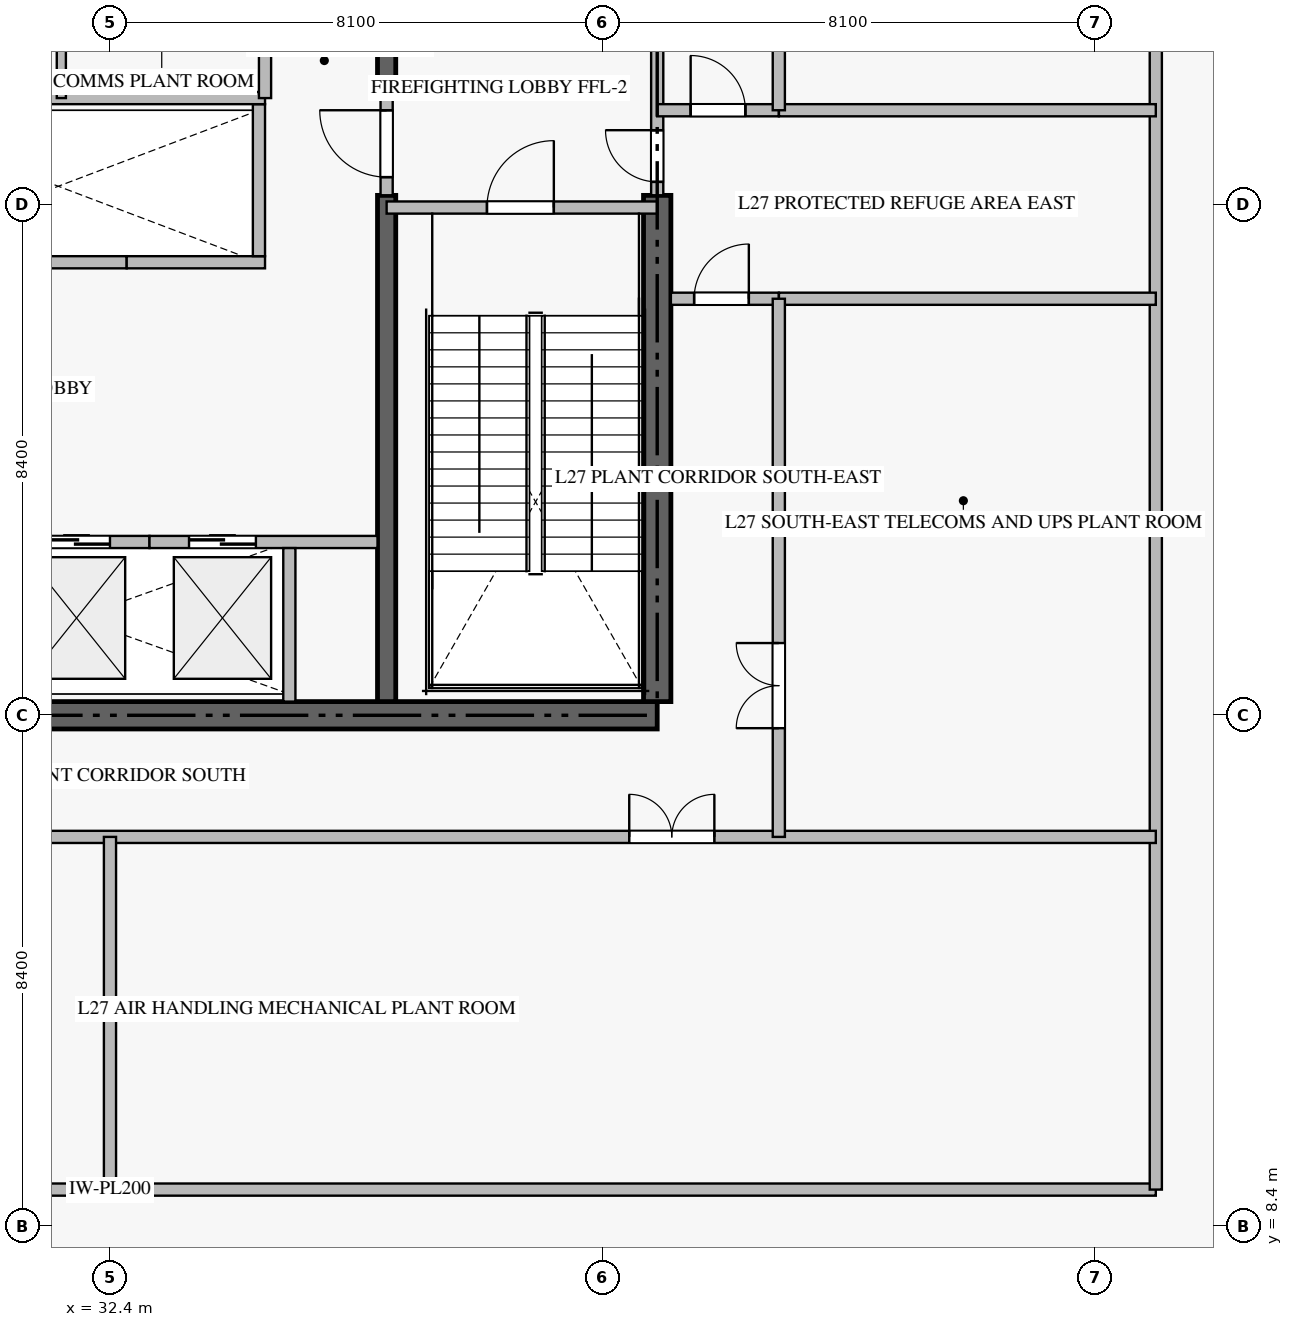
"""IFC4 building model, lengths in metres.
Left out: names, types, materials, properties, quantities, classifications, styles, units other than length and angle.
Written with IfcOpenShell. Run it as: python <this file> out.ifc"""

import sys

from ifc_helpers import new_model, si_unit, direction, frame, frame_2d, origin, place, context, subcontext, project, spatial, rectangle, extrude, source, transform, mapped, element, fill, save


model = new_model("IFC4")
c1 = context("Model", 3, precision=1e-05, world=origin(), true_north=direction((0.0, 1.0)))
c2 = subcontext(c1, "Body", "Model", "MODEL_VIEW")
j1 = project(units=[si_unit("LENGTHUNIT", "METRE"), si_unit("PLANEANGLEUNIT", "RADIAN")], contexts=[c1])
p1 = place(None, origin())
s1 = spatial("IfcSite", under=j1, at=p1, CompositionType="ELEMENT")
p2 = place(p1, origin())
s2 = spatial("IfcBuilding", under=s1, at=p2, CompositionType="ELEMENT")
p3 = place(p2, frame((0.0, 0.0, 109.2)))
s3 = spatial("IfcBuildingStorey", under=s2, at=p3, CompositionType="ELEMENT", Elevation=109.2)
p4 = place(p3, frame((23.4, 16.8, -0.36), z_axis=(0.0, 0.0, 1.0), x_axis=(1.0, 0.0, 0.0)))
e1 = element("IfcWall", 1, at=p4, inside=s3, PredefinedType="SHEAR", context=c2, shape_type="SweptSolid", body=[
    extrude(rectangle(XDim=18.0, YDim=0.45, at=frame_2d((9.0, 0.0))), origin(), (0.0, 0.0, 1.0), 5.998),
])
p5 = place(p3, frame((41.4, 17.025, -0.36), z_axis=(0.0, 0.0, 1.0), x_axis=(0.0, 1.0, 0.0)))
e2 = element("IfcWall", 2, at=p5, inside=s3, PredefinedType="SHEAR", context=c2, shape_type="SweptSolid", body=[
    extrude(rectangle(XDim=8.325, YDim=0.45, at=frame_2d((4.163, 0.0))), origin(), (0.0, 0.0, 1.0), 5.998),
])
p6 = place(p3, frame((36.95, 17.025, -0.36), z_axis=(0.0, 0.0, 1.0), x_axis=(0.0, 1.0, 0.0)))
e3 = element("IfcWall", 3, at=p6, inside=s3, PredefinedType="SHEAR", context=c2, shape_type="SweptSolid", body=[
    extrude(rectangle(XDim=8.325, YDim=0.3, at=frame_2d((4.163, 0.0))), origin(), (0.0, 0.0, 1.0), 5.998),
])
p7 = place(p3, frame((36.95, 27.05, -0.36), z_axis=(0.0, 0.0, 1.0), x_axis=(0.0, 1.0, 0.0)))
e4 = element("IfcWall", 4, at=p7, inside=s3, PredefinedType="SHEAR", context=c2, shape_type="SweptSolid", body=[
    extrude(rectangle(XDim=6.325, YDim=0.3, at=frame_2d((3.163, 0.0))), origin(), (0.0, 0.0, 1.0), 5.998),
])
p8 = place(p3, frame((36.95, 25.15, 0.0), z_axis=(0.0, 0.0, 1.0), x_axis=(1.0, 0.0, 0.0)))
e5 = element("IfcWall", 5, at=p8, inside=s3, PredefinedType="STANDARD", context=c2, shape_type="SweptSolid", body=[
    extrude(rectangle(XDim=4.45, YDim=0.2, at=frame_2d((2.225, 0.0))), origin(), (0.0, 0.0, 1.0), 5.64),
])
p9 = place(p8, frame((1.65, 0.0, 0.0)))
e6 = element("IfcOpeningElement", 6, at=p9, cuts=e5, PredefinedType="OPENING", context=c2, shape_type="SweptSolid", body=[
    extrude(rectangle(XDim=1.1, YDim=2.15, at=frame_2d((0.55, 1.075))), frame((0.0, 0.11, 0.0), z_axis=(0.0, -1.0, 0.0), x_axis=(1.0, 0.0, 0.0)), (0.0, 0.0, 1.0), 0.22),
])
p10 = place(p3, frame((30.65, 19.65, 0.0), z_axis=(0.0, 0.0, 1.0), x_axis=(1.0, 0.0, 0.0)))
e7 = element("IfcWall", 7, at=p10, inside=s3, PredefinedType="STANDARD", context=c2, shape_type="SweptSolid", body=[
    extrude(rectangle(XDim=2.4, YDim=0.2, at=frame_2d((1.2, 0.0))), origin(), (0.0, 0.0, 1.0), 5.64),
])
p11 = place(p10, frame((0.65, 0.0, 0.0)))
e8 = element("IfcOpeningElement", 8, at=p11, cuts=e7, PredefinedType="OPENING", context=c2, shape_type="SweptSolid", body=[
    extrude(rectangle(XDim=1.1, YDim=2.2, at=frame_2d((0.55, 1.1))), frame((0.0, 0.11, 0.0), z_axis=(0.0, -1.0, 0.0), x_axis=(1.0, 0.0, 0.0)), (0.0, 0.0, 1.0), 0.22),
])
p12 = place(p3, frame((33.05, 19.65, 0.0), z_axis=(0.0, 0.0, 1.0), x_axis=(1.0, 0.0, 0.0)))
e9 = element("IfcWall", 9, at=p12, inside=s3, PredefinedType="STANDARD", context=c2, shape_type="SweptSolid", body=[
    extrude(rectangle(XDim=3.75, YDim=0.2, at=frame_2d((1.875, 0.0))), origin(), (0.0, 0.0, 1.0), 5.64),
])
p13 = place(p12, frame((0.65, 0.0, 0.0)))
e10 = element("IfcOpeningElement", 10, at=p13, cuts=e9, PredefinedType="OPENING", context=c2, shape_type="SweptSolid", body=[
    extrude(rectangle(XDim=1.1, YDim=2.2, at=frame_2d((0.55, 1.1))), frame((0.0, 0.11, 0.0), z_axis=(0.0, -1.0, 0.0), x_axis=(1.0, 0.0, 0.0)), (0.0, 0.0, 1.0), 0.22),
])
p14 = place(p3, frame((35.35, 17.025, 0.0), z_axis=(0.0, 0.0, 1.0), x_axis=(0.0, 1.0, 0.0)))
e11 = element("IfcWall", 11, at=p14, inside=s3, PredefinedType="STANDARD", context=c2, shape_type="SweptSolid", body=[
    extrude(rectangle(XDim=2.525, YDim=0.2, at=frame_2d((1.263, 0.0))), origin(), (0.0, 0.0, 1.0), 5.64),
])
p15 = place(p3, frame((30.425, 24.25, 0.0), z_axis=(0.0, 0.0, 1.0), x_axis=(1.0, 0.0, 0.0)))
e12 = element("IfcWall", 12, at=p15, inside=s3, PredefinedType="STANDARD", context=c2, shape_type="SweptSolid", body=[
    extrude(rectangle(XDim=2.25, YDim=0.2, at=frame_2d((1.125, 0.0))), origin(), (0.0, 0.0, 1.0), 5.64),
])
p16 = place(p3, frame((32.675, 24.25, 0.0), z_axis=(0.0, 0.0, 1.0), x_axis=(1.0, 0.0, 0.0)))
e13 = element("IfcWall", 13, at=p16, inside=s3, PredefinedType="STANDARD", context=c2, shape_type="SweptSolid", body=[
    extrude(rectangle(XDim=2.275, YDim=0.2, at=frame_2d((1.137, 0.0))), origin(), (0.0, 0.0, 1.0), 5.64),
])
p17 = place(p3, frame((34.85, 24.35, 0.0), z_axis=(0.0, 0.0, 1.0), x_axis=(0.0, 1.0, 0.0)))
e14 = element("IfcWall", 14, at=p17, inside=s3, PredefinedType="STANDARD", context=c2, shape_type="SweptSolid", body=[
    extrude(rectangle(XDim=2.5, YDim=0.2, at=frame_2d((1.25, 0.0))), origin(), (0.0, 0.0, 1.0), 5.64),
])
p18 = place(p3, frame((41.4, 25.352, 0.0), z_axis=(0.0, 0.0, 1.0), x_axis=(0.0, 1.0, 0.0)))
e15 = element("IfcWall", 15, at=p18, inside=s3, PredefinedType="STANDARD", context=c2, shape_type="SweptSolid", body=[
    extrude(rectangle(XDim=2.396, YDim=0.2, at=frame_2d((1.198, 0.0))), origin(), (0.0, 0.0, 1.0), 5.64),
])
p19 = place(p18, frame((0.22, 0.0, 0.0)))
e16 = element("IfcOpeningElement", 16, at=p19, cuts=e15, PredefinedType="OPENING", context=c2, shape_type="SweptSolid", body=[
    extrude(rectangle(XDim=0.85, YDim=2.1, at=frame_2d((0.425, 1.05))), frame((0.0, 0.11, 0.0), z_axis=(0.0, -1.0, 0.0), x_axis=(1.0, 0.0, 0.0)), (0.0, 0.0, 1.0), 0.22),
])
p20 = place(p3, frame((36.95, 25.352, 0.0), z_axis=(0.0, 0.0, 1.0), x_axis=(0.0, 1.0, 0.0)))
e17 = element("IfcWall", 17, at=p20, inside=s3, PredefinedType="STANDARD", context=c2, shape_type="SweptSolid", body=[
    extrude(rectangle(XDim=1.696, YDim=0.2, at=frame_2d((0.848, 0.0))), origin(), (0.0, 0.0, 1.0), 5.64),
])
p21 = place(p20, frame((0.298, 0.0, 0.0)))
e18 = element("IfcOpeningElement", 18, at=p21, cuts=e17, PredefinedType="OPENING", context=c2, shape_type="SweptSolid", body=[
    extrude(rectangle(XDim=1.1, YDim=2.15, at=frame_2d((0.55, 1.075))), frame((0.0, 0.11, 0.0), z_axis=(0.0, -1.0, 0.0), x_axis=(1.0, 0.0, 0.0)), (0.0, 0.0, 1.0), 0.22),
])
p22 = place(p3, frame((28.0, 26.95, 0.0), z_axis=(0.0, 0.0, 1.0), x_axis=(1.0, 0.0, 0.0)))
e19 = element("IfcWall", 19, at=p22, inside=s3, PredefinedType="STANDARD", context=c2, shape_type="SweptSolid", body=[
    extrude(rectangle(XDim=6.95, YDim=0.2, at=frame_2d((3.475, 0.0))), origin(), (0.0, 0.0, 1.0), 5.64),
])
p23 = place(p3, frame((34.95, 26.95, 0.0), z_axis=(0.0, 0.0, 1.0), x_axis=(0.0, 1.0, 0.0)))
e20 = element("IfcWall", 20, at=p23, inside=s3, PredefinedType="STANDARD", context=c2, shape_type="SweptSolid", body=[
    extrude(rectangle(XDim=3.6, YDim=0.2, at=frame_2d((1.8, 0.0))), origin(), (0.0, 0.0, 1.0), 5.64),
])
p24 = place(p23, frame((1.35, 0.0, 0.0)))
e21 = element("IfcOpeningElement", 21, at=p24, cuts=e20, PredefinedType="OPENING", context=c2, shape_type="SweptSolid", body=[
    extrude(rectangle(XDim=0.9, YDim=2.1, at=frame_2d((0.45, 1.05))), frame((0.0, 0.11, 0.0), z_axis=(0.0, -1.0, 0.0), x_axis=(1.0, 0.0, 0.0)), (0.0, 0.0, 1.0), 0.22),
])
p25 = place(p3, frame((31.6, 26.95, 0.0), z_axis=(0.0, 0.0, 1.0), x_axis=(0.0, 1.0, 0.0)))
e22 = element("IfcWall", 22, at=p25, inside=s3, PredefinedType="PARTITIONING", context=c2, shape_type="SweptSolid", body=[
    extrude(rectangle(XDim=3.6, YDim=0.15, at=frame_2d((1.8, 0.0))), origin(), (0.0, 0.0, 1.0), 5.64),
])
p26 = place(p25, frame((1.375, 0.0, 0.0)))
e23 = element("IfcOpeningElement", 23, at=p26, cuts=e22, PredefinedType="OPENING", context=c2, shape_type="SweptSolid", body=[
    extrude(rectangle(XDim=0.85, YDim=2.1, at=frame_2d((0.425, 1.05))), frame((0.0, 0.085, 0.0), z_axis=(0.0, -1.0, 0.0), x_axis=(1.0, 0.0, 0.0)), (0.0, 0.0, 1.0), 0.17),
])
p27 = place(p3, frame((15.2, 9.0, 0.0), z_axis=(0.0, 0.0, 1.0), x_axis=(1.0, 0.0, 0.0)))
e24 = element("IfcWall", 24, at=p27, inside=s3, PredefinedType="STANDARD", context=c2, shape_type="SweptSolid", body=[
    extrude(rectangle(XDim=34.4, YDim=0.2, at=frame_2d((17.2, 0.0))), origin(), (0.0, 0.0, 1.0), 5.64),
])
p28 = place(p3, frame((49.6, 9.0, 0.0), z_axis=(0.0, 0.0, 1.0), x_axis=(0.0, 1.0, 0.0)))
e25 = element("IfcWall", 25, at=p28, inside=s3, PredefinedType="STANDARD", context=c2, shape_type="SweptSolid", body=[
    extrude(rectangle(XDim=32.4, YDim=0.2, at=frame_2d((16.2, 0.0))), origin(), (0.0, 0.0, 1.0), 5.072),
])
p29 = place(p3, frame((41.625, 23.65, 0.0), z_axis=(0.0, 0.0, 1.0), x_axis=(1.0, 0.0, 0.0)))
e26 = element("IfcWall", 26, at=p29, inside=s3, PredefinedType="STANDARD", context=c2, shape_type="SweptSolid", body=[
    extrude(rectangle(XDim=1.775, YDim=0.2, at=frame_2d((0.887, 0.0))), origin(), (0.0, 0.0, 1.0), 5.64),
])
p30 = place(p29, frame((0.382, 0.0, 0.0)))
e27 = element("IfcOpeningElement", 27, at=p30, cuts=e26, PredefinedType="OPENING", context=c2, shape_type="SweptSolid", body=[
    extrude(rectangle(XDim=0.9, YDim=2.1, at=frame_2d((0.45, 1.05))), frame((0.0, 0.11, 0.0), z_axis=(0.0, -1.0, 0.0), x_axis=(1.0, 0.0, 0.0)), (0.0, 0.0, 1.0), 0.22),
])
p31 = place(p3, frame((43.402, 23.65, 0.0), z_axis=(0.0, 0.0, 1.0), x_axis=(1.0, 0.0, 0.0)))
e28 = element("IfcWall", 28, at=p31, inside=s3, PredefinedType="STANDARD", context=c2, shape_type="SweptSolid", body=[
    extrude(rectangle(XDim=6.198, YDim=0.2, at=frame_2d((3.099, 0.0))), origin(), (0.0, 0.0, 1.0), 5.64),
])
p32 = place(p3, frame((41.4, 26.75, 0.0), z_axis=(0.0, 0.0, 1.0), x_axis=(1.0, 0.0, 0.0)))
e29 = element("IfcWall", 29, at=p32, inside=s3, PredefinedType="STANDARD", context=c2, shape_type="SweptSolid", body=[
    extrude(rectangle(XDim=2.0, YDim=0.2, at=frame_2d((1.0, 0.0))), origin(), (0.0, 0.0, 1.0), 5.64),
])
p33 = place(p32, frame((0.55, 0.0, 0.0)))
e30 = element("IfcOpeningElement", 30, at=p33, cuts=e29, PredefinedType="OPENING", context=c2, shape_type="SweptSolid", body=[
    extrude(rectangle(XDim=0.9, YDim=2.1, at=frame_2d((0.45, 1.05))), frame((0.0, 0.11, 0.0), z_axis=(0.0, -1.0, 0.0), x_axis=(1.0, 0.0, 0.0)), (0.0, 0.0, 1.0), 0.22),
])
p34 = place(p3, frame((43.402, 26.75, 0.0), z_axis=(0.0, 0.0, 1.0), x_axis=(1.0, 0.0, 0.0)))
e31 = element("IfcWall", 31, at=p34, inside=s3, PredefinedType="STANDARD", context=c2, shape_type="SweptSolid", body=[
    extrude(rectangle(XDim=6.198, YDim=0.2, at=frame_2d((3.099, 0.0))), origin(), (0.0, 0.0, 1.0), 5.64),
])
p35 = place(p3, frame((15.2, 14.8, 0.0), z_axis=(0.0, 0.0, 1.0), x_axis=(1.0, 0.0, 0.0)))
e32 = element("IfcWall", 32, at=p35, inside=s3, PredefinedType="STANDARD", context=c2, shape_type="SweptSolid", body=[
    extrude(rectangle(XDim=34.4, YDim=0.2, at=frame_2d((17.2, 0.0))), origin(), (0.0, 0.0, 1.0), 5.64),
])
p36 = place(p35, frame((7.26, 0.0, 0.0)))
e33 = element("IfcOpeningElement", 33, at=p36, cuts=e32, PredefinedType="OPENING", context=c2, shape_type="SweptSolid", body=[
    extrude(rectangle(XDim=1.4, YDim=2.2, at=frame_2d((0.7, 1.1))), frame((0.0, 0.11, 0.0), z_axis=(0.0, -1.0, 0.0), x_axis=(1.0, 0.0, 0.0)), (0.0, 0.0, 1.0), 0.22),
])
p37 = place(p35, frame((25.74, 0.0, 0.0)))
e34 = element("IfcOpeningElement", 34, at=p37, cuts=e32, PredefinedType="OPENING", context=c2, shape_type="SweptSolid", body=[
    extrude(rectangle(XDim=1.4, YDim=2.2, at=frame_2d((0.7, 1.1))), frame((0.0, 0.11, 0.0), z_axis=(0.0, -1.0, 0.0), x_axis=(1.0, 0.0, 0.0)), (0.0, 0.0, 1.0), 0.22),
])
p38 = place(p3, frame((32.4, 9.0, 0.0), z_axis=(0.0, 0.0, 1.0), x_axis=(0.0, 1.0, 0.0)))
e35 = element("IfcWall", 35, at=p38, inside=s3, PredefinedType="STANDARD", context=c2, shape_type="SweptSolid", body=[
    extrude(rectangle(XDim=5.8, YDim=0.2, at=frame_2d((2.9, 0.0))), origin(), (0.0, 0.0, 1.0), 5.64),
])
p39 = place(p3, frame((43.4, 14.8, 0.0), z_axis=(0.0, 0.0, 1.0), x_axis=(0.0, 1.0, 0.0)))
e36 = element("IfcWall", 36, at=p39, inside=s3, PredefinedType="STANDARD", context=c2, shape_type="SweptSolid", body=[
    extrude(rectangle(XDim=8.85, YDim=0.2, at=frame_2d((4.425, 0.0))), origin(), (0.0, 0.0, 1.0), 5.64),
])
p40 = place(p39, frame((1.788, 0.0, 0.0)))
e37 = element("IfcOpeningElement", 37, at=p40, cuts=e36, PredefinedType="OPENING", context=c2, shape_type="SweptSolid", body=[
    extrude(rectangle(XDim=1.4, YDim=2.2, at=frame_2d((0.7, 1.1))), frame((0.0, 0.11, 0.0), z_axis=(0.0, -1.0, 0.0), x_axis=(1.0, 0.0, 0.0)), (0.0, 0.0, 1.0), 0.22),
])
p41 = place(p3, frame((43.4, 26.75, 0.0), z_axis=(0.0, 0.0, 1.0), x_axis=(0.0, 1.0, 0.0)))
e38 = element("IfcWall", 38, at=p41, inside=s3, PredefinedType="STANDARD", context=c2, shape_type="SweptSolid", body=[
    extrude(rectangle(XDim=8.85, YDim=0.2, at=frame_2d((4.425, 0.0))), origin(), (0.0, 0.0, 1.0), 5.64),
])
p42 = place(p41, frame((5.662, 0.0, 0.0)))
e39 = element("IfcOpeningElement", 39, at=p42, cuts=e38, PredefinedType="OPENING", context=c2, shape_type="SweptSolid", body=[
    extrude(rectangle(XDim=1.4, YDim=2.2, at=frame_2d((0.7, 1.1))), frame((0.0, 0.11, 0.0), z_axis=(0.0, -1.0, 0.0), x_axis=(1.0, 0.0, 0.0)), (0.0, 0.0, 1.0), 0.22),
])
m1 = source(origin(), c2, "Body", "SweptSolid", [
    extrude(rectangle(XDim=1.1, YDim=2.15, at=frame_2d((0.55, 1.075))), frame((0.0, 0.025, 0.0), z_axis=(0.0, -1.0, 0.0), x_axis=(1.0, 0.0, 0.0)), (0.0, 0.0, 1.0), 0.05),
])
p43 = place(p9, origin())
e40 = element("IfcDoor", 40, at=p43, inside=s3, OperationType="SINGLE_SWING_RIGHT", PredefinedType="DOOR", context=c2, shape_type="MappedRepresentation", body=[
    mapped(m1, transform((0.0, 0.0, 0.0), scale=1.0)),
])
fill(e6, e40)
m2 = source(origin(), c2, "Body", "SweptSolid", [
    extrude(rectangle(XDim=1.1, YDim=2.2, at=frame_2d((0.55, 1.1))), frame((0.0, 0.025, 0.0), z_axis=(0.0, -1.0, 0.0), x_axis=(1.0, 0.0, 0.0)), (0.0, 0.0, 1.0), 0.05),
])
p44 = place(p11, origin())
e41 = element("IfcDoor", 41, at=p44, inside=s3, OperationType="DOUBLE_DOOR_SLIDING", PredefinedType="DOOR", context=c2, shape_type="MappedRepresentation", body=[
    mapped(m2, transform((0.0, 0.0, 0.0), scale=1.0)),
])
fill(e8, e41)
p45 = place(p13, origin())
e42 = element("IfcDoor", 42, at=p45, inside=s3, OperationType="DOUBLE_DOOR_SLIDING", PredefinedType="DOOR", context=c2, shape_type="MappedRepresentation", body=[
    mapped(m2, transform((0.0, 0.0, 0.0), scale=1.0)),
])
fill(e10, e42)
m3 = source(origin(), c2, "Body", "SweptSolid", [
    extrude(rectangle(XDim=0.85, YDim=2.1, at=frame_2d((0.425, 1.05))), frame((0.0, 0.025, 0.0), z_axis=(0.0, -1.0, 0.0), x_axis=(1.0, 0.0, 0.0)), (0.0, 0.0, 1.0), 0.05),
])
p46 = place(p19, origin())
e43 = element("IfcDoor", 43, at=p46, inside=s3, OperationType="SINGLE_SWING_RIGHT", PredefinedType="DOOR", context=c2, shape_type="MappedRepresentation", body=[
    mapped(m3, transform((0.0, 0.0, 0.0), scale=1.0)),
])
fill(e16, e43)
p47 = place(p21, origin())
e44 = element("IfcDoor", 44, at=p47, inside=s3, OperationType="SINGLE_SWING_RIGHT", PredefinedType="DOOR", context=c2, shape_type="MappedRepresentation", body=[
    mapped(m1, transform((0.0, 0.0, 0.0), scale=1.0)),
])
fill(e18, e44)
m4 = source(origin(), c2, "Body", "SweptSolid", [
    extrude(rectangle(XDim=0.9, YDim=2.1, at=frame_2d((0.45, 1.05))), frame((0.0, 0.025, 0.0), z_axis=(0.0, -1.0, 0.0), x_axis=(1.0, 0.0, 0.0)), (0.0, 0.0, 1.0), 0.05),
])
p48 = place(p30, origin())
e45 = element("IfcDoor", 45, at=p48, inside=s3, OperationType="SINGLE_SWING_RIGHT", PredefinedType="DOOR", context=c2, shape_type="MappedRepresentation", body=[
    mapped(m4, transform((0.0, 0.0, 0.0), scale=1.0)),
])
fill(e27, e45)
p49 = place(p33, origin())
e46 = element("IfcDoor", 46, at=p49, inside=s3, OperationType="SINGLE_SWING_LEFT", PredefinedType="DOOR", context=c2, shape_type="MappedRepresentation", body=[
    mapped(m4, transform((0.0, 0.0, 0.0), scale=1.0)),
])
fill(e30, e46)
m5 = source(origin(), c2, "Body", "SweptSolid", [
    extrude(rectangle(XDim=1.4, YDim=2.2, at=frame_2d((0.7, 1.1))), frame((0.0, 0.025, 0.0), z_axis=(0.0, -1.0, 0.0), x_axis=(1.0, 0.0, 0.0)), (0.0, 0.0, 1.0), 0.05),
])
p50 = place(p37, origin())
e47 = element("IfcDoor", 47, at=p50, inside=s3, OperationType="DOUBLE_DOOR_SINGLE_SWING", PredefinedType="DOOR", context=c2, shape_type="MappedRepresentation", body=[
    mapped(m5, transform((0.0, 0.0, 0.0), scale=1.0)),
])
fill(e34, e47)
p51 = place(p40, origin())
e48 = element("IfcDoor", 48, at=p51, inside=s3, OperationType="DOUBLE_DOOR_SINGLE_SWING", PredefinedType="DOOR", context=c2, shape_type="MappedRepresentation", body=[
    mapped(m5, transform((0.0, 0.0, 0.0), scale=1.0)),
])
fill(e37, e48)
save(model, sys.argv[1])
